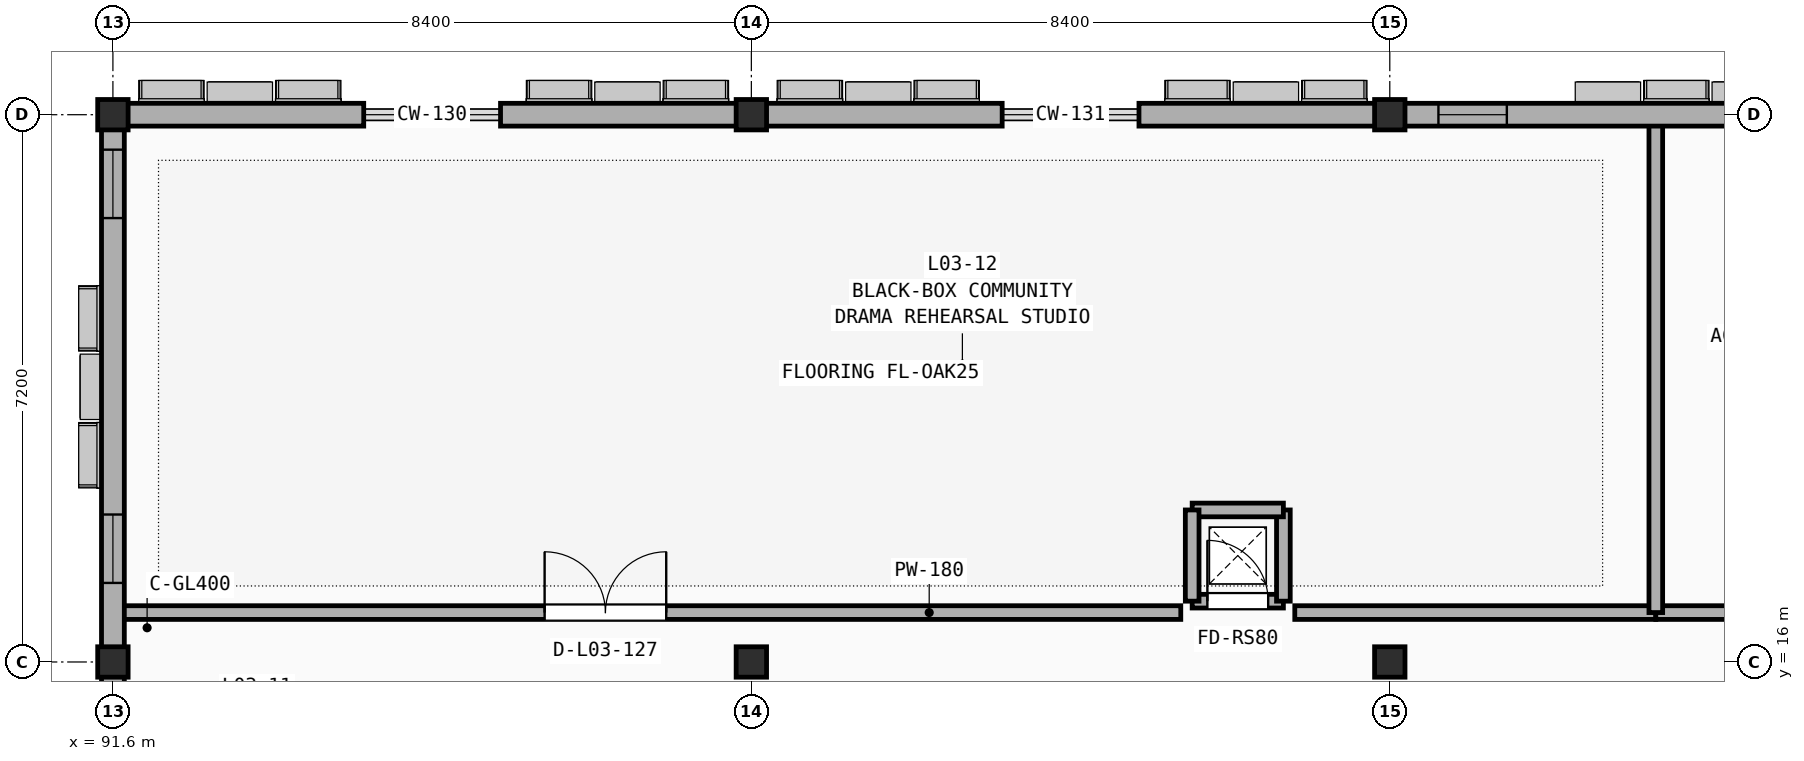
"""IFC4 building model, lengths in metres.
Left out: names, types, materials, properties, quantities, classifications, styles, units other than length and angle.
Written with IfcOpenShell. Run it as: python <this file> out.ifc"""

import sys

from ifc_helpers import new_model, si_unit, direction, frame, frame_2d, origin, origin_2d, place, context, subcontext, project, spatial, rectangle, extrude, element, fill, save


model = new_model("IFC4")
c1 = context("Model", 3, precision=1e-05, world=origin(), true_north=direction((0.0, 1.0)))
c2 = subcontext(c1, "Body", "Model", "MODEL_VIEW")
j1 = project(units=[si_unit("LENGTHUNIT", "METRE"), si_unit("PLANEANGLEUNIT", "RADIAN")], contexts=[c1])
p1 = place(None, origin())
s1 = spatial("IfcSite", under=j1, at=p1, CompositionType="ELEMENT")
p2 = place(p1, origin())
s2 = spatial("IfcBuilding", under=s1, at=p2, CompositionType="ELEMENT")
p3 = place(p2, frame((0.0, 0.0, 13.8)))
s3 = spatial("IfcBuildingStorey", under=s2, at=p3, CompositionType="ELEMENT", Elevation=13.8)
for number, where, z_axis, x_axis in (
    (1, (91.6, 16.0, 0.0), (0.0, 0.0, 1.0), (1.0, 0.0, 0.0)),
    (2, (91.6, 23.2, 0.0), (0.0, 0.0, 1.0), (1.0, 0.0, 0.0)),
    (3, (100.0, 16.0, 0.0), (0.0, 0.0, 1.0), (1.0, 0.0, 0.0)),
    (4, (100.0, 23.2, 0.0), (0.0, 0.0, 1.0), (1.0, 0.0, 0.0)),
    (5, (108.4, 16.0, 0.0), (0.0, 0.0, 1.0), (1.0, 0.0, 0.0)),
    (6, (108.4, 23.2, 0.0), (0.0, 0.0, 1.0), (1.0, 0.0, 0.0)),
):
    element("IfcColumn", number, at=place(p3, frame(where, z_axis=z_axis, x_axis=x_axis)), inside=s3, PredefinedType="COLUMN", context=c2, shape_type="SweptSolid", body=[
        extrude(rectangle(XDim=0.4, YDim=0.4, at=origin_2d()), origin(), (0.0, 0.0, 1.0), 3.9),
    ])
p4 = place(p3, frame((91.74, 16.65, 0.0), z_axis=(0.0, 0.0, 1.0), x_axis=(1.0, 0.0, 0.0)))
e7 = element("IfcWall", 7, at=p4, inside=s3, PredefinedType="PARTITIONING", context=c2, shape_type="SweptSolid", body=[
    extrude(rectangle(XDim=13.91, YDim=0.18, at=frame_2d((6.955, 0.0))), origin(), (0.0, 0.0, 1.0), 3.09),
])
p5 = place(p4, frame((5.54, 0.0, -0.01)))
e8 = element("IfcOpeningElement", 8, at=p5, cuts=e7, PredefinedType="OPENING", context=c2, shape_type="SweptSolid", body=[
    extrude(rectangle(XDim=1.6, YDim=2.21, at=frame_2d((0.8, 1.105))), frame((0.0, 0.1, 0.0), z_axis=(0.0, -1.0, 0.0), x_axis=(1.0, 0.0, 0.0)), (0.0, 0.0, 1.0), 0.2),
])
p6 = place(p3, frame((107.15, 16.65, 0.0), z_axis=(0.0, 0.0, 1.0), x_axis=(1.0, 0.0, 0.0)))
e9 = element("IfcWall", 9, at=p6, inside=s3, PredefinedType="PARTITIONING", context=c2, shape_type="SweptSolid", body=[
    extrude(rectangle(XDim=4.75, YDim=0.18, at=frame_2d((2.375, 0.0))), origin(), (0.0, 0.0, 1.0), 3.09),
])
p7 = place(p3, frame((111.9, 16.65, 0.0), z_axis=(0.0, 0.0, 1.0), x_axis=(1.0, 0.0, 0.0)))
e10 = element("IfcWall", 10, at=p7, inside=s3, PredefinedType="PARTITIONING", context=c2, shape_type="SweptSolid", body=[
    extrude(rectangle(XDim=4.76, YDim=0.18, at=frame_2d((2.38, 0.0))), origin(), (0.0, 0.0, 1.0), 3.09),
])
p8 = place(p7, frame((1.88, 0.0, -0.01)))
e11 = element("IfcOpeningElement", 11, at=p8, cuts=e10, PredefinedType="OPENING", context=c2, shape_type="SweptSolid", body=[
    extrude(rectangle(XDim=1.0, YDim=2.16, at=frame_2d((0.5, 1.08))), frame((0.0, 0.1, 0.0), z_axis=(0.0, -1.0, 0.0), x_axis=(1.0, 0.0, 0.0)), (0.0, 0.0, 1.0), 0.2),
])
p9 = place(p3, frame((111.9, 16.65, 0.0), z_axis=(0.0, 0.0, 1.0), x_axis=(0.0, 1.0, 0.0)))
e12 = element("IfcWall", 12, at=p9, inside=s3, PredefinedType="PARTITIONING", context=c2, shape_type="SweptSolid", body=[
    extrude(rectangle(XDim=6.41, YDim=0.18, at=frame_2d((3.205, 0.0))), origin(), (0.0, 0.0, 1.0), 3.01),
])
p10 = place(p3, frame((100.0, 23.2, 0.0), z_axis=(0.0, 0.0, 1.0), x_axis=(-1.0, 0.0, 0.0)))
e13 = element("IfcWall", 13, at=p10, inside=s3, PredefinedType="SOLIDWALL", context=c2, shape_type="SweptSolid", body=[
    extrude(rectangle(XDim=3.3, YDim=0.3, at=frame_2d((1.65, 0.0))), origin(), (0.0, 0.0, 1.0), 3.01),
])
for number, where, z_axis, x_axis in (
    (14, (94.9, 23.2, 0.0), (0.0, 0.0, 1.0), (-1.0, 0.0, 0.0)),
    (15, (108.4, 23.2, 0.0), (0.0, 0.0, 1.0), (-1.0, 0.0, 0.0)),
):
    element("IfcWall", number, at=place(p3, frame(where, z_axis=z_axis, x_axis=x_axis)), inside=s3, PredefinedType="SOLIDWALL", context=c2, shape_type="SweptSolid", body=[
        extrude(rectangle(XDim=3.3, YDim=0.3, at=frame_2d((1.65, 0.0))), origin(), (0.0, 0.0, 1.0), 3.01),
    ])
p11 = place(p3, frame((103.3, 23.2, 0.0), z_axis=(0.0, 0.0, 1.0), x_axis=(-1.0, 0.0, 0.0)))
e16 = element("IfcWall", 16, at=p11, inside=s3, PredefinedType="SOLIDWALL", context=c2, shape_type="SweptSolid", body=[
    extrude(rectangle(XDim=3.3, YDim=0.3, at=frame_2d((1.65, 0.0))), origin(), (0.0, 0.0, 1.0), 3.01),
])
p12 = place(p3, frame((116.8, 23.2, 0.0), z_axis=(0.0, 0.0, 1.0), x_axis=(-1.0, 0.0, 0.0)))
e17 = element("IfcWall", 17, at=p12, inside=s3, PredefinedType="SOLIDWALL", context=c2, shape_type="SweptSolid", body=[
    extrude(rectangle(XDim=8.4, YDim=0.3, at=frame_2d((4.2, 0.0))), origin(), (0.0, 0.0, 1.0), 3.01),
])
p13 = place(p12, frame((0.46, 0.0, 0.85)))
e18 = element("IfcOpeningElement", 18, at=p13, cuts=e17, PredefinedType="OPENING", context=c2, shape_type="SweptSolid", body=[
    extrude(rectangle(XDim=0.9, YDim=2.02, at=frame_2d((0.45, 1.01))), frame((0.0, 0.16, 0.0), z_axis=(0.0, -1.0, 0.0), x_axis=(1.0, 0.0, 0.0)), (0.0, 0.0, 1.0), 0.32),
])
p14 = place(p12, frame((6.86, 0.0, 0.85)))
e19 = element("IfcOpeningElement", 19, at=p14, cuts=e17, PredefinedType="OPENING", context=c2, shape_type="SweptSolid", body=[
    extrude(rectangle(XDim=0.9, YDim=2.02, at=frame_2d((0.45, 1.01))), frame((0.0, 0.16, 0.0), z_axis=(0.0, -1.0, 0.0), x_axis=(1.0, 0.0, 0.0)), (0.0, 0.0, 1.0), 0.32),
])
p15 = place(p3, frame((91.6, 16.0, 0.0), z_axis=(0.0, 0.0, 1.0), x_axis=(0.0, -1.0, 0.0)))
e20 = element("IfcWall", 20, at=p15, inside=s3, PredefinedType="SOLIDWALL", context=c2, shape_type="SweptSolid", body=[
    extrude(rectangle(XDim=2.7, YDim=0.3, at=frame_2d((1.35, 0.0))), origin(), (0.0, 0.0, 1.0), 3.01),
])
p16 = place(p3, frame((91.6, 23.2, 0.0), z_axis=(0.0, 0.0, 1.0), x_axis=(0.0, -1.0, 0.0)))
e21 = element("IfcWall", 21, at=p16, inside=s3, PredefinedType="SOLIDWALL", context=c2, shape_type="SweptSolid", body=[
    extrude(rectangle(XDim=7.2, YDim=0.3, at=frame_2d((3.6, 0.0))), origin(), (0.0, 0.0, 1.0), 3.01),
])
p17 = place(p16, frame((0.46, 0.0, 0.85)))
e22 = element("IfcOpeningElement", 22, at=p17, cuts=e21, PredefinedType="OPENING", context=c2, shape_type="SweptSolid", body=[
    extrude(rectangle(XDim=0.9, YDim=2.02, at=frame_2d((0.45, 1.01))), frame((0.0, 0.16, 0.0), z_axis=(0.0, -1.0, 0.0), x_axis=(1.0, 0.0, 0.0)), (0.0, 0.0, 1.0), 0.32),
])
p18 = place(p16, frame((5.26, 0.0, 0.85)))
e23 = element("IfcOpeningElement", 23, at=p18, cuts=e21, PredefinedType="OPENING", context=c2, shape_type="SweptSolid", body=[
    extrude(rectangle(XDim=0.9, YDim=2.02, at=frame_2d((0.45, 1.01))), frame((0.0, 0.16, 0.0), z_axis=(0.0, -1.0, 0.0), x_axis=(1.0, 0.0, 0.0)), (0.0, 0.0, 1.0), 0.32),
])
p19 = place(p3, frame((105.8, 16.8, 0.0), z_axis=(0.0, 0.0, 1.0), x_axis=(1.0, 0.0, 0.0)))
e24 = element("IfcWall", 24, at=p19, inside=s3, PredefinedType="SOLIDWALL", context=c2, shape_type="SweptSolid", body=[
    extrude(rectangle(XDim=1.2, YDim=0.18, at=frame_2d((0.6, 0.0))), origin(), (0.0, 0.0, 1.0), 3.69),
])
p20 = place(p19, frame((0.2, 0.0, -0.01)))
e25 = element("IfcOpeningElement", 25, at=p20, cuts=e24, PredefinedType="OPENING", context=c2, shape_type="SweptSolid", body=[
    extrude(rectangle(XDim=0.8, YDim=2.06, at=frame_2d((0.4, 1.03))), frame((0.0, 0.1, 0.0), z_axis=(0.0, -1.0, 0.0), x_axis=(1.0, 0.0, 0.0)), (0.0, 0.0, 1.0), 0.2),
])
for number, where, z_axis, x_axis in (
    (26, (107.0, 16.8, 0.0), (0.0, 0.0, 1.0), (0.0, 1.0, 0.0)),
    (27, (107.0, 18.0, 0.0), (0.0, 0.0, 1.0), (-1.0, 0.0, 0.0)),
    (28, (105.8, 18.0, 0.0), (0.0, 0.0, 1.0), (0.0, -1.0, 0.0)),
):
    element("IfcWall", number, at=place(p3, frame(where, z_axis=z_axis, x_axis=x_axis)), inside=s3, PredefinedType="SOLIDWALL", context=c2, shape_type="SweptSolid", body=[
        extrude(rectangle(XDim=1.2, YDim=0.18, at=frame_2d((0.6, 0.0))), origin(), (0.0, 0.0, 1.0), 3.69),
    ])
p21 = place(p5, frame((0.0, 0.0, 0.01)))
e29 = element("IfcDoor", 29, at=p21, inside=s3, OperationType="DOUBLE_SWING_LEFT", PredefinedType="DOOR", context=c2, shape_type="SweptSolid", body=[
    extrude(rectangle(XDim=1.6, YDim=2.2, at=frame_2d((0.8, 1.1))), frame((0.0, 0.025, 0.0), z_axis=(0.0, -1.0, 0.0), x_axis=(1.0, 0.0, 0.0)), (0.0, 0.0, 1.0), 0.05),
])
fill(e8, e29)
p22 = place(p14, origin())
e30 = element("IfcWindow", 30, at=p22, inside=s3, PartitioningType="SINGLE_PANEL", PredefinedType="WINDOW", context=c2, shape_type="SweptSolid", body=[
    extrude(rectangle(XDim=0.9, YDim=2.02, at=frame_2d((0.45, 1.01))), frame((0.0, 0.03, 0.0), z_axis=(0.0, -1.0, 0.0), x_axis=(1.0, 0.0, 0.0)), (0.0, 0.0, 1.0), 0.06),
])
fill(e19, e30)
p23 = place(p17, origin())
e31 = element("IfcWindow", 31, at=p23, inside=s3, PartitioningType="SINGLE_PANEL", PredefinedType="WINDOW", context=c2, shape_type="SweptSolid", body=[
    extrude(rectangle(XDim=0.9, YDim=2.02, at=frame_2d((0.45, 1.01))), frame((0.0, 0.03, 0.0), z_axis=(0.0, -1.0, 0.0), x_axis=(1.0, 0.0, 0.0)), (0.0, 0.0, 1.0), 0.06),
])
fill(e22, e31)
p24 = place(p18, origin())
e32 = element("IfcWindow", 32, at=p24, inside=s3, PartitioningType="SINGLE_PANEL", PredefinedType="WINDOW", context=c2, shape_type="SweptSolid", body=[
    extrude(rectangle(XDim=0.9, YDim=2.02, at=frame_2d((0.45, 1.01))), frame((0.0, 0.03, 0.0), z_axis=(0.0, -1.0, 0.0), x_axis=(1.0, 0.0, 0.0)), (0.0, 0.0, 1.0), 0.06),
])
fill(e23, e32)
p25 = place(p20, frame((0.0, 0.0, 0.01)))
e33 = element("IfcDoor", 33, at=p25, inside=s3, OperationType="SINGLE_SWING_LEFT", PredefinedType="DOOR", context=c2, shape_type="SweptSolid", body=[
    extrude(rectangle(XDim=0.8, YDim=2.05, at=frame_2d((0.4, 1.025))), frame((0.0, 0.025, 0.0), z_axis=(0.0, -1.0, 0.0), x_axis=(1.0, 0.0, 0.0)), (0.0, 0.0, 1.0), 0.05),
])
fill(e25, e33)
save(model, sys.argv[1])
